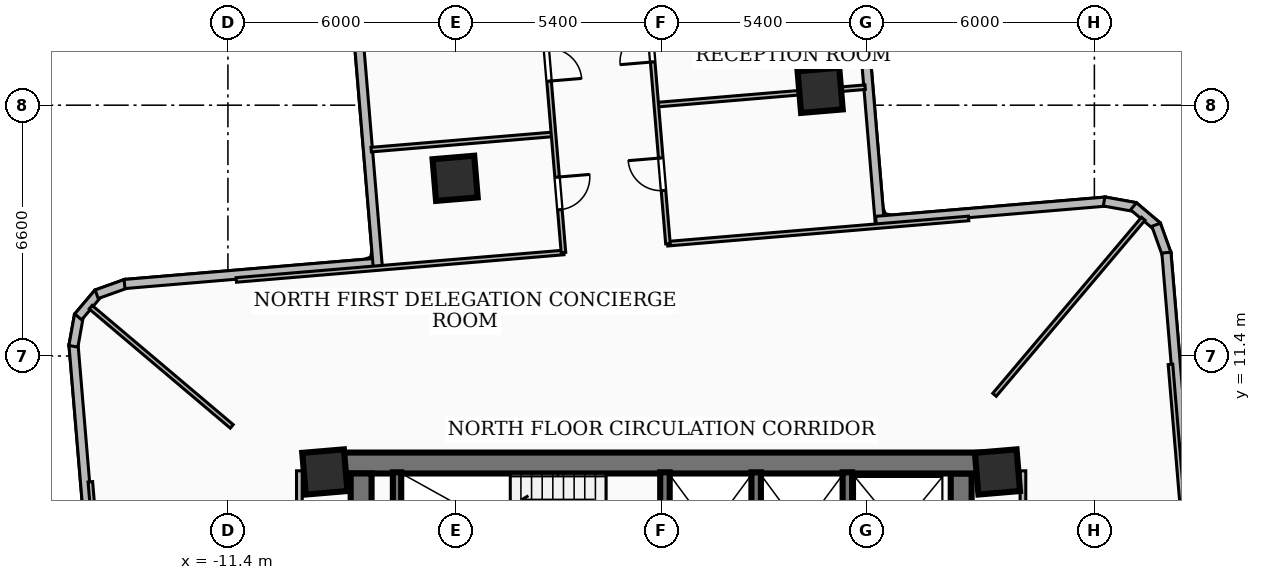
"""IFC4 building model, lengths in metres.
Left out: names, types, materials, properties, quantities, classifications, styles, units other than length and angle.
Written with IfcOpenShell. Run it as: python <this file> out.ifc"""

import sys

from ifc_helpers import new_model, si_unit, direction, frame, frame_2d, origin, origin_2d, place, context, subcontext, project, spatial, rectangle, extrude, element, fill, save


model = new_model("IFC4")
c1 = context("Model", 3, precision=1e-05, world=origin(), true_north=direction((0.0, 1.0)))
c2 = subcontext(c1, "Body", "Model", "MODEL_VIEW")
j1 = project(units=[si_unit("LENGTHUNIT", "METRE"), si_unit("PLANEANGLEUNIT", "RADIAN")], contexts=[c1])
p1 = place(None, origin())
s1 = spatial("IfcSite", under=j1, at=p1, CompositionType="ELEMENT")
p2 = place(p1, origin())
s2 = spatial("IfcBuilding", under=s1, at=p2, CompositionType="ELEMENT")
p3 = place(p2, frame((0.0, 0.0, 64.08)))
s3 = spatial("IfcBuildingStorey", under=s2, at=p3, CompositionType="ELEMENT", Elevation=64.08)
p4 = place(p3, frame((-8.78, 8.585, 0.0), z_axis=(0.0, 0.0, 1.0), x_axis=(1.0, 0.0, 0.0)))
e1 = element("IfcWall", 1, at=p4, inside=s3, PredefinedType="SHEAR", context=c2, shape_type="SweptSolid", body=[
    extrude(rectangle(XDim=17.56, YDim=0.55, at=frame_2d((8.78, 0.0))), origin(), (0.0, 0.0, 1.0), 3.34),
])
for number, where, z_axis, x_axis in (
    (2, (-7.895, 2.025, 0.0), (0.0, 0.0, 1.0), (0.0, 1.0, 0.0)),
    (3, (7.895, 8.31, 0.0), (0.0, 0.0, 1.0), (0.0, -1.0, 0.0)),
):
    element("IfcWall", number, at=place(p3, frame(where, z_axis=z_axis, x_axis=x_axis)), inside=s3, PredefinedType="SHEAR", context=c2, shape_type="SweptSolid", body=[
        extrude(rectangle(XDim=6.285, YDim=0.55, at=frame_2d((3.143, 0.0))), origin(), (0.0, 0.0, 1.0), 3.34),
    ])
p5 = place(p3, frame((-6.95, 5.28, 0.0), z_axis=(0.0, 0.0, 1.0), x_axis=(0.0, 1.0, 0.0)))
e4 = element("IfcWall", 4, at=p5, inside=s3, PredefinedType="SOLIDWALL", context=c2, shape_type="SweptSolid", body=[
    extrude(rectangle(XDim=3.06, YDim=0.22, at=frame_2d((1.53, 0.0))), origin(), (0.0, 0.0, 1.0), 3.34),
])
for number, where, z_axis, x_axis in (
    (5, (0.1, 5.3, 0.0), (0.0, 0.0, 1.0), (0.0, 1.0, 0.0)),
    (6, (2.5, 5.3, 0.0), (0.0, 0.0, 1.0), (0.0, 1.0, 0.0)),
    (7, (4.9, 5.3, 0.0), (0.0, 0.0, 1.0), (0.0, 1.0, 0.0)),
):
    element("IfcWall", number, at=place(p3, frame(where, z_axis=z_axis, x_axis=x_axis)), inside=s3, PredefinedType="SOLIDWALL", context=c2, shape_type="SweptSolid", body=[
        extrude(rectangle(XDim=3.04, YDim=0.25, at=frame_2d((1.52, 0.0))), origin(), (0.0, 0.0, 1.0), 3.34),
    ])
for number, where, z_axis, x_axis in (
    (8, (-8.85, 8.35, 0.0), (0.0, 0.0, 1.0), (0.996, 0.084, 0.0)),
    (9, (8.85, 8.35, 0.0), (0.0, 0.0, 1.0), (0.996, 0.084, 0.0)),
    (10, (4.184, 18.391, 0.0), (0.0, 0.0, 1.0), (0.996, 0.084, 0.0)),
    (11, (-5.421, 16.076, 0.0), (0.0, 0.0, 1.0), (0.996, 0.084, 0.0)),
):
    element("IfcColumn", number, at=place(p3, frame(where, z_axis=z_axis, x_axis=x_axis)), inside=s3, PredefinedType="COLUMN", context=c2, shape_type="SweptSolid", body=[
        extrude(rectangle(XDim=1.1, YDim=1.1, at=origin_2d()), origin(), (0.0, 0.0, 1.0), 3.6),
    ])
p6 = place(p3, frame((-14.956, 5.652, 0.0), z_axis=(0.0, 0.0, 1.0), x_axis=(-0.083627472659, 0.996497087711, 0.0)))
e12 = element("IfcWall", 12, at=p6, inside=s3, PredefinedType="SOLIDWALL", context=c2, shape_type="SweptSolid", body=[
    extrude(rectangle(XDim=6.075, YDim=0.24, at=frame_2d((3.038, 0.0))), origin(), (0.0, 0.0, 1.0), 3.34),
])
p7 = place(p3, frame((-15.466, 11.656, 0.0), z_axis=(0.0, 0.0, 1.0), x_axis=(0.175678791378, 0.98444754165, 0.0)))
e13 = element("IfcWall", 13, at=p7, inside=s3, PredefinedType="SOLIDWALL", context=c2, shape_type="SweptSolid", body=[
    extrude(rectangle(XDim=0.831, YDim=0.24, at=frame_2d((0.416, 0.0))), origin(), (0.0, 0.0, 1.0), 3.34),
])
p8 = place(p3, frame((-15.34, 12.43, 0.0), z_axis=(0.0, 0.0, 1.0), x_axis=(0.645767595037, 0.763534028842, 0.0)))
e14 = element("IfcWall", 14, at=p8, inside=s3, PredefinedType="SOLIDWALL", context=c2, shape_type="SweptSolid", body=[
    extrude(rectangle(XDim=0.815, YDim=0.24, at=frame_2d((0.407, 0.0))), origin(), (0.0, 0.0, 1.0), 3.34),
])
p9 = place(p3, frame((-14.854, 13.025, 0.0), z_axis=(0.0, 0.0, 1.0), x_axis=(0.941455621898, 0.337136933599, 0.0)))
e15 = element("IfcWall", 15, at=p9, inside=s3, PredefinedType="SOLIDWALL", context=c2, shape_type="SweptSolid", body=[
    extrude(rectangle(XDim=0.831, YDim=0.24, at=frame_2d((0.415, 0.0))), origin(), (0.0, 0.0, 1.0), 3.34),
])
p10 = place(p3, frame((-14.121, 13.295, 0.0), z_axis=(0.0, 0.0, 1.0), x_axis=(0.99648986367, 0.083713509088, 0.0)))
e16 = element("IfcWall", 16, at=p10, inside=s3, PredefinedType="SOLIDWALL", context=c2, shape_type="SweptSolid", body=[
    extrude(rectangle(XDim=6.775, YDim=0.24, at=frame_2d((3.387, 0.0))), origin(), (0.0, 0.0, 1.0), 3.34),
])
p11 = place(p3, frame((-7.458, 13.758, 0.0), z_axis=(0.0, 0.0, 1.0), x_axis=(-0.083631732273, 0.996496730229, 0.0)))
e17 = element("IfcWall", 17, at=p11, inside=s3, PredefinedType="SOLIDWALL", context=c2, shape_type="SweptSolid", body=[
    extrude(rectangle(XDim=13.475, YDim=0.24, at=frame_2d((6.738, 0.0))), origin(), (0.0, 0.0, 1.0), 3.34),
])
p12 = place(p11, frame((10.575, 0.0, 0.85)))
e18 = element("IfcOpeningElement", 18, at=p12, cuts=e17, PredefinedType="OPENING", context=c2, shape_type="SweptSolid", body=[
    extrude(rectangle(XDim=1.8, YDim=1.8, at=frame_2d((0.9, 0.9))), frame((0.0, 0.13, 0.0), z_axis=(0.0, -1.0, 0.0), x_axis=(1.0, 0.0, 0.0)), (0.0, 0.0, 1.0), 0.26),
])
p13 = place(p3, frame((4.629, 28.296, 0.0), z_axis=(0.0, 0.0, 1.0), x_axis=(0.083649723304, -0.996495220155, 0.0)))
e19 = element("IfcWall", 19, at=p13, inside=s3, PredefinedType="SOLIDWALL", context=c2, shape_type="SweptSolid", body=[
    extrude(rectangle(XDim=13.475, YDim=0.24, at=frame_2d((6.738, 0.0))), origin(), (0.0, 0.0, 1.0), 2.152),
])
p14 = place(p3, frame((5.652, 14.956, 0.0), z_axis=(0.0, 0.0, 1.0), x_axis=(0.996497087711, 0.083627472659, 0.0)))
e20 = element("IfcWall", 20, at=p14, inside=s3, PredefinedType="SOLIDWALL", context=c2, shape_type="SweptSolid", body=[
    extrude(rectangle(XDim=6.075, YDim=0.24, at=frame_2d((3.038, 0.0))), origin(), (0.0, 0.0, 1.0), 2.072),
])
p15 = place(p3, frame((11.656, 15.466, 0.0), z_axis=(0.0, 0.0, 1.0), x_axis=(0.98444754165, -0.175678791378, 0.0)))
e21 = element("IfcWall", 21, at=p15, inside=s3, PredefinedType="SOLIDWALL", context=c2, shape_type="SweptSolid", body=[
    extrude(rectangle(XDim=0.831, YDim=0.24, at=frame_2d((0.416, 0.0))), origin(), (0.0, 0.0, 1.0), 3.34),
])
p16 = place(p3, frame((12.43, 15.34, 0.0), z_axis=(0.0, 0.0, 1.0), x_axis=(0.763534028842, -0.645767595037, 0.0)))
e22 = element("IfcWall", 22, at=p16, inside=s3, PredefinedType="SOLIDWALL", context=c2, shape_type="SweptSolid", body=[
    extrude(rectangle(XDim=0.815, YDim=0.24, at=frame_2d((0.407, 0.0))), origin(), (0.0, 0.0, 1.0), 3.34),
])
p17 = place(p3, frame((13.025, 14.854, 0.0), z_axis=(0.0, 0.0, 1.0), x_axis=(0.337136933599, -0.941455621898, 0.0)))
e23 = element("IfcWall", 23, at=p17, inside=s3, PredefinedType="SOLIDWALL", context=c2, shape_type="SweptSolid", body=[
    extrude(rectangle(XDim=0.831, YDim=0.24, at=frame_2d((0.415, 0.0))), origin(), (0.0, 0.0, 1.0), 3.34),
])
p18 = place(p3, frame((13.295, 14.121, 0.0), z_axis=(0.0, 0.0, 1.0), x_axis=(0.083713509088, -0.99648986367, 0.0)))
e24 = element("IfcWall", 24, at=p18, inside=s3, PredefinedType="SOLIDWALL", context=c2, shape_type="SweptSolid", body=[
    extrude(rectangle(XDim=6.775, YDim=0.24, at=frame_2d((3.387, 0.0))), origin(), (0.0, 0.0, 1.0), 2.072),
])
for number, where, z_axis, x_axis in (
    (25, (-9.52, 1.75, 0.0), (0.0, 0.0, 1.0), (0.0, 1.0, 0.0)),
    (26, (9.52, 1.75, 0.0), (0.0, 0.0, 1.0), (0.0, 1.0, 0.0)),
):
    element("IfcWall", number, at=place(p3, frame(where, z_axis=z_axis, x_axis=x_axis)), inside=s3, PredefinedType="PARTITIONING", context=c2, shape_type="SweptSolid", body=[
        extrude(rectangle(XDim=6.63, YDim=0.15, at=frame_2d((3.315, 0.0))), origin(), (0.0, 0.0, 1.0), 2.152),
    ])
p19 = place(p3, frame((8.772, 10.38, 0.0), z_axis=(0.0, 0.0, 1.0), x_axis=(0.645424146464, 0.763824371935, 0.0)))
e27 = element("IfcWall", 27, at=p19, inside=s3, PredefinedType="PARTITIONING", context=c2, shape_type="SweptSolid", body=[
    extrude(rectangle(XDim=6.064, YDim=0.12, at=frame_2d((3.032, 0.0))), origin(), (0.0, 0.0, 1.0), 2.072),
])
p20 = place(p3, frame((-11.3, 9.549, 0.0), z_axis=(0.0, 0.0, 1.0), x_axis=(-0.763780578352, 0.645475970221, 0.0)))
e28 = element("IfcWall", 28, at=p20, inside=s3, PredefinedType="PARTITIONING", context=c2, shape_type="SweptSolid", body=[
    extrude(rectangle(XDim=4.86, YDim=0.12, at=frame_2d((2.43, 0.0))), origin(), (0.0, 0.0, 1.0), 3.34),
])
p21 = place(p3, frame((14.125, 2.561, 0.0), z_axis=(0.0, 0.0, 1.0), x_axis=(-0.083580419953, 0.996501035323, 0.0)))
e29 = element("IfcWall", 29, at=p21, inside=s3, PredefinedType="PARTITIONING", context=c2, shape_type="SweptSolid", body=[
    extrude(rectangle(XDim=8.649, YDim=0.12, at=frame_2d((4.325, 0.0))), origin(), (0.0, 0.0, 1.0), 2.072),
])
p22 = place(p3, frame((-2.561, 14.125, 0.0), z_axis=(0.0, 0.0, 1.0), x_axis=(-0.996501035323, -0.083580419953, 0.0)))
e30 = element("IfcWall", 30, at=p22, inside=s3, PredefinedType="PARTITIONING", context=c2, shape_type="SweptSolid", body=[
    extrude(rectangle(XDim=8.649, YDim=0.12, at=frame_2d((4.325, 0.0))), origin(), (0.0, 0.0, 1.0), 2.152),
])
p23 = place(p3, frame((8.091, 15.02, 0.0), z_axis=(0.0, 0.0, 1.0), x_axis=(-0.99649495528, -0.083652878615, 0.0)))
e31 = element("IfcWall", 31, at=p23, inside=s3, PredefinedType="PARTITIONING", context=c2, shape_type="SweptSolid", body=[
    extrude(rectangle(XDim=7.95, YDim=0.12, at=frame_2d((3.975, 0.0))), origin(), (0.0, 0.0, 1.0), 2.072),
])
p24 = place(p3, frame((-2.852, 17.232, 0.0), z_axis=(0.0, 0.0, 1.0), x_axis=(-0.996498541433, -0.083610148443, 0.0)))
e32 = element("IfcWall", 32, at=p24, inside=s3, PredefinedType="PARTITIONING", context=c2, shape_type="SweptSolid", body=[
    extrude(rectangle(XDim=4.795, YDim=0.12, at=frame_2d((2.397, 0.0))), origin(), (0.0, 0.0, 1.0), 2.152),
])
p25 = place(p3, frame((5.368, 18.474, 0.0), z_axis=(0.0, 0.0, 1.0), x_axis=(-0.996486987726, -0.08374773605, 0.0)))
e33 = element("IfcWall", 33, at=p25, inside=s3, PredefinedType="PARTITIONING", context=c2, shape_type="SweptSolid", body=[
    extrude(rectangle(XDim=5.495, YDim=0.12, at=frame_2d((2.748, 0.0))), origin(), (0.0, 0.0, 1.0), 2.152),
])
p26 = place(p3, frame((-3.139, 20.891, 0.0), z_axis=(0.0, 0.0, 1.0), x_axis=(0.083622669872, -0.996497490756, 0.0)))
e34 = element("IfcWall", 34, at=p26, inside=s3, PredefinedType="PARTITIONING", context=c2, shape_type="SweptSolid", body=[
    extrude(rectangle(XDim=6.791, YDim=0.12, at=frame_2d((3.396, 0.0))), origin(), (0.0, 0.0, 1.0), 2.152),
])
p27 = place(p26, frame((4.801, 0.0, 0.0)))
e35 = element("IfcOpeningElement", 35, at=p27, cuts=e34, PredefinedType="OPENING", context=c2, shape_type="SweptSolid", body=[
    extrude(rectangle(XDim=0.86, YDim=2.04, at=frame_2d((0.43, 1.02))), frame((0.0, 0.07, 0.0), z_axis=(0.0, -1.0, 0.0), x_axis=(1.0, 0.0, 0.0)), (0.0, 0.0, 1.0), 0.14),
])
p28 = place(p26, frame((1.406, 0.0, 0.0)))
e36 = element("IfcOpeningElement", 36, at=p28, cuts=e34, PredefinedType="OPENING", context=c2, shape_type="SweptSolid", body=[
    extrude(rectangle(XDim=0.86, YDim=2.04, at=frame_2d((0.43, 1.02))), frame((0.0, 0.07, 0.0), z_axis=(0.0, -1.0, 0.0), x_axis=(1.0, 0.0, 0.0)), (0.0, 0.0, 1.0), 0.14),
])
p29 = place(p3, frame((0.179, 14.355, 0.0), z_axis=(0.0, 0.0, 1.0), x_axis=(-0.083622669872, 0.996497490756, 0.0)))
e37 = element("IfcWall", 37, at=p29, inside=s3, PredefinedType="PARTITIONING", context=c2, shape_type="SweptSolid", body=[
    extrude(rectangle(XDim=6.791, YDim=0.12, at=frame_2d((3.396, 0.0))), origin(), (0.0, 0.0, 1.0), 2.152),
])
p30 = place(p29, frame((1.405, 0.0, 0.0)))
e38 = element("IfcOpeningElement", 38, at=p30, cuts=e37, PredefinedType="OPENING", context=c2, shape_type="SweptSolid", body=[
    extrude(rectangle(XDim=0.86, YDim=2.04, at=frame_2d((0.43, 1.02))), frame((0.0, 0.07, 0.0), z_axis=(0.0, -1.0, 0.0), x_axis=(1.0, 0.0, 0.0)), (0.0, 0.0, 1.0), 0.14),
])
p31 = place(p29, frame((4.8, 0.0, 0.0)))
e39 = element("IfcOpeningElement", 39, at=p31, cuts=e37, PredefinedType="OPENING", context=c2, shape_type="SweptSolid", body=[
    extrude(rectangle(XDim=0.86, YDim=2.04, at=frame_2d((0.43, 1.02))), frame((0.0, 0.07, 0.0), z_axis=(0.0, -1.0, 0.0), x_axis=(1.0, 0.0, 0.0)), (0.0, 0.0, 1.0), 0.14),
])
p32 = place(p3, frame((-15.02, 8.091, 0.0), z_axis=(0.0, 0.0, 1.0), x_axis=(0.083652878615, -0.99649495528, 0.0)))
e40 = element("IfcWall", 40, at=p32, inside=s3, PredefinedType="PARTITIONING", context=c2, shape_type="SweptSolid", body=[
    extrude(rectangle(XDim=7.95, YDim=0.12, at=frame_2d((3.975, 0.0))), origin(), (0.0, 0.0, 1.0), 2.152),
])
p33 = place(p27, origin())
e41 = element("IfcDoor", 41, at=p33, inside=s3, OperationType="SINGLE_SWING_LEFT", PredefinedType="DOOR", context=c2, shape_type="SweptSolid", body=[
    extrude(rectangle(XDim=0.86, YDim=2.04, at=frame_2d((0.43, 1.02))), frame((0.0, 0.025, 0.0), z_axis=(0.0, -1.0, 0.0), x_axis=(1.0, 0.0, 0.0)), (0.0, 0.0, 1.0), 0.05),
])
fill(e35, e41)
p34 = place(p28, origin())
e42 = element("IfcDoor", 42, at=p34, inside=s3, OperationType="SINGLE_SWING_RIGHT", PredefinedType="DOOR", context=c2, shape_type="SweptSolid", body=[
    extrude(rectangle(XDim=0.86, YDim=2.04, at=frame_2d((0.43, 1.02))), frame((0.0, 0.025, 0.0), z_axis=(0.0, -1.0, 0.0), x_axis=(1.0, 0.0, 0.0)), (0.0, 0.0, 1.0), 0.05),
])
fill(e36, e42)
p35 = place(p30, origin())
e43 = element("IfcDoor", 43, at=p35, inside=s3, OperationType="SINGLE_SWING_RIGHT", PredefinedType="DOOR", context=c2, shape_type="SweptSolid", body=[
    extrude(rectangle(XDim=0.86, YDim=2.04, at=frame_2d((0.43, 1.02))), frame((0.0, 0.025, 0.0), z_axis=(0.0, -1.0, 0.0), x_axis=(1.0, 0.0, 0.0)), (0.0, 0.0, 1.0), 0.05),
])
fill(e38, e43)
p36 = place(p31, origin())
e44 = element("IfcDoor", 44, at=p36, inside=s3, OperationType="SINGLE_SWING_LEFT", PredefinedType="DOOR", context=c2, shape_type="SweptSolid", body=[
    extrude(rectangle(XDim=0.86, YDim=2.04, at=frame_2d((0.43, 1.02))), frame((0.0, 0.025, 0.0), z_axis=(0.0, -1.0, 0.0), x_axis=(1.0, 0.0, 0.0)), (0.0, 0.0, 1.0), 0.05),
])
fill(e39, e44)
save(model, sys.argv[1])
